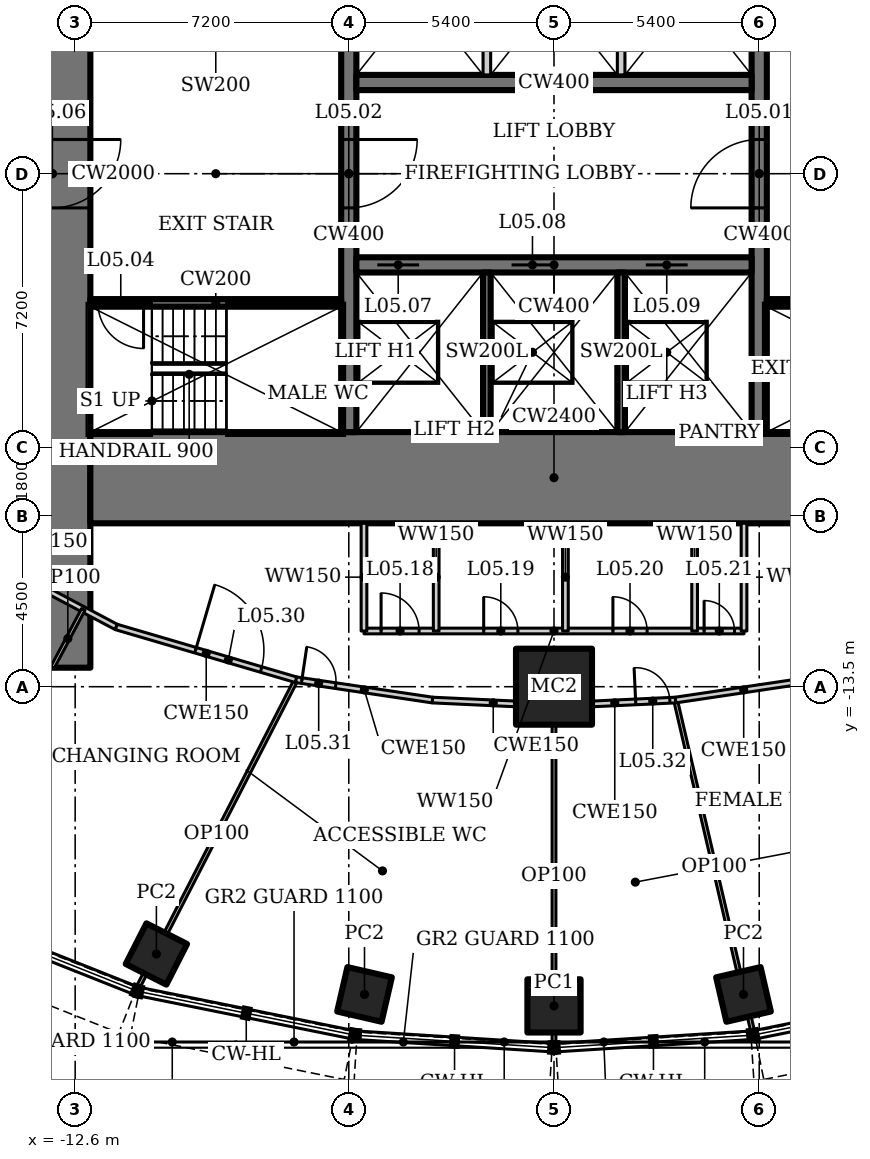
"""IFC4 building model, lengths in metres.
Left out: names, types, materials, properties, quantities, classifications, styles, units other than length and angle.
Written with IfcOpenShell. Run it as: python <this file> out.ifc"""

import sys

from ifc_helpers import new_model, si_unit, direction, frame, frame_2d, origin, origin_2d, place, context, subcontext, project, spatial, rectangle, hollow_rectangle, extrude, element, fill, save


model = new_model("IFC4")
c1 = context("Model", 3, precision=1e-05, world=origin(), true_north=direction((0.0, 1.0)))
c2 = subcontext(c1, "Body", "Model", "MODEL_VIEW")
j1 = project(units=[si_unit("LENGTHUNIT", "METRE"), si_unit("PLANEANGLEUNIT", "RADIAN")], contexts=[c1])
p1 = place(None, origin())
s1 = spatial("IfcSite", under=j1, at=p1, CompositionType="ELEMENT")
p2 = place(p1, origin())
s2 = spatial("IfcBuilding", under=s1, at=p2, CompositionType="ELEMENT")
p3 = place(p2, frame((0.0, 0.0, 32.0)))
s3 = spatial("IfcBuildingStorey", under=s2, at=p3, CompositionType="ELEMENT", Elevation=32.0)
p4 = place(p3, frame((0.0, -13.5, 0.0), z_axis=(0.0, 0.0, 1.0), x_axis=(1.0, 0.0, 0.0)))
e1 = element("IfcColumn", 1, at=p4, inside=s3, PredefinedType="COLUMN", context=c2, shape_type="SweptSolid", body=[
    extrude(hollow_rectangle(XDim=2.0, YDim=2.0, WallThickness=0.17, at=origin_2d()), origin(), (0.0, 0.0, 1.0), 5.0),
])
for number, where, z_axis, x_axis in (
    (2, (-10.463, -20.534, 0.0), (0.0, 0.0, 1.0), (0.454, 0.891, 0.0)),
    (3, (-4.986, -21.598, 0.0), (0.0, 0.0, 1.0), (0.225, 0.974, 0.0)),
):
    element("IfcColumn", number, at=place(p3, frame(where, z_axis=z_axis, x_axis=x_axis)), inside=s3, PredefinedType="COLUMN", context=c2, shape_type="SweptSolid", body=[
        extrude(hollow_rectangle(XDim=1.2, YDim=1.2, WallThickness=0.1, at=origin_2d()), origin(), (0.0, 0.0, 1.0), 5.0),
    ])
p5 = place(p3, frame((0.0, -21.9, 0.0), z_axis=(0.0, 0.0, 1.0), x_axis=(1.0, 0.0, 0.0)))
e4 = element("IfcColumn", 4, at=p5, inside=s3, PredefinedType="COLUMN", context=c2, shape_type="SweptSolid", body=[
    extrude(hollow_rectangle(XDim=1.4, YDim=1.4, WallThickness=0.1, at=origin_2d()), origin(), (0.0, 0.0, 1.0), 5.0),
])
p6 = place(p3, frame((4.986, -21.598, 0.0), z_axis=(0.0, 0.0, 1.0), x_axis=(0.974370064785, 0.224951054344, 0.0)))
e5 = element("IfcColumn", 5, at=p6, inside=s3, PredefinedType="COLUMN", context=c2, shape_type="SweptSolid", body=[
    extrude(hollow_rectangle(XDim=1.2, YDim=1.2, WallThickness=0.1, at=origin_2d()), origin(), (0.0, 0.0, 1.0), 5.0),
])
p7 = place(p3, frame((-13.2, 13.0, 0.0), z_axis=(0.0, 0.0, 1.0), x_axis=(0.0, -1.0, 0.0)))
e6 = element("IfcWall", 6, at=p7, inside=s3, PredefinedType="SHEAR", context=c2, shape_type="SweptSolid", body=[
    extrude(rectangle(XDim=26.0, YDim=2.0, at=frame_2d((13.0, 0.0))), origin(), (0.0, 0.0, 1.0), 5.0),
])
p8 = place(p7, frame((12.1, 0.0, 0.0)))
e7 = element("IfcOpeningElement", 7, at=p8, cuts=e6, PredefinedType="OPENING", context=c2, shape_type="SweptSolid", body=[
    extrude(rectangle(XDim=1.8, YDim=2.1, at=frame_2d((0.9, 1.05))), frame((0.0, 1.01, 0.0), z_axis=(0.0, -1.0, 0.0), x_axis=(1.0, 0.0, 0.0)), (0.0, 0.0, 1.0), 2.02),
])
p9 = place(p3, frame((-12.2, -8.0, 0.0), z_axis=(0.0, 0.0, 1.0), x_axis=(1.0, 0.0, 0.0)))
e8 = element("IfcWall", 8, at=p9, inside=s3, PredefinedType="SHEAR", context=c2, shape_type="SweptSolid", body=[
    extrude(rectangle(XDim=24.4, YDim=2.4, at=frame_2d((12.2, 0.0))), origin(), (0.0, 0.0, 1.0), 5.0),
])
p10 = place(p3, frame((5.4, -6.8, 0.0), z_axis=(0.0, 0.0, 1.0), x_axis=(0.0, 1.0, 0.0)))
e9 = element("IfcWall", 9, at=p10, inside=s3, PredefinedType="SHEAR", context=c2, shape_type="SweptSolid", body=[
    extrude(rectangle(XDim=13.6, YDim=0.4, at=frame_2d((6.8, 0.0))), origin(), (0.0, 0.0, 1.0), 5.0),
])
p11 = place(p10, frame((5.9, 0.0, 0.0)))
e10 = element("IfcOpeningElement", 10, at=p11, cuts=e9, PredefinedType="OPENING", context=c2, shape_type="SweptSolid", body=[
    extrude(rectangle(XDim=1.8, YDim=2.1, at=frame_2d((0.9, 1.05))), frame((0.0, 0.21, 0.0), z_axis=(0.0, -1.0, 0.0), x_axis=(1.0, 0.0, 0.0)), (0.0, 0.0, 1.0), 0.42),
])
p12 = place(p3, frame((-5.4, 6.8, 0.0), z_axis=(0.0, 0.0, 1.0), x_axis=(0.0, -1.0, 0.0)))
e11 = element("IfcWall", 11, at=p12, inside=s3, PredefinedType="SHEAR", context=c2, shape_type="SweptSolid", body=[
    extrude(rectangle(XDim=13.6, YDim=0.4, at=frame_2d((6.8, 0.0))), origin(), (0.0, 0.0, 1.0), 5.0),
])
p13 = place(p12, frame((5.9, 0.0, 0.0)))
e12 = element("IfcOpeningElement", 12, at=p13, cuts=e11, PredefinedType="OPENING", context=c2, shape_type="SweptSolid", body=[
    extrude(rectangle(XDim=1.8, YDim=2.1, at=frame_2d((0.9, 1.05))), frame((0.0, 0.21, 0.0), z_axis=(0.0, -1.0, 0.0), x_axis=(1.0, 0.0, 0.0)), (0.0, 0.0, 1.0), 0.42),
])
p14 = place(p3, frame((-5.2, -2.4, 0.0), z_axis=(0.0, 0.0, 1.0), x_axis=(1.0, 0.0, 0.0)))
e13 = element("IfcWall", 13, at=p14, inside=s3, PredefinedType="SHEAR", context=c2, shape_type="SweptSolid", body=[
    extrude(rectangle(XDim=10.4, YDim=0.4, at=frame_2d((5.2, 0.0))), origin(), (0.0, 0.0, 1.0), 5.0),
])
p15 = place(p14, frame((0.55, 0.0, 0.0)))
e14 = element("IfcOpeningElement", 14, at=p15, cuts=e13, PredefinedType="OPENING", context=c2, shape_type="SweptSolid", body=[
    extrude(rectangle(XDim=1.1, YDim=2.2, at=frame_2d((0.55, 1.1))), frame((0.0, 0.21, 0.0), z_axis=(0.0, -1.0, 0.0), x_axis=(1.0, 0.0, 0.0)), (0.0, 0.0, 1.0), 0.42),
])
p16 = place(p14, frame((4.083, 0.0, 0.0)))
e15 = element("IfcOpeningElement", 15, at=p16, cuts=e13, PredefinedType="OPENING", context=c2, shape_type="SweptSolid", body=[
    extrude(rectangle(XDim=1.1, YDim=2.2, at=frame_2d((0.55, 1.1))), frame((0.0, 0.21, 0.0), z_axis=(0.0, -1.0, 0.0), x_axis=(1.0, 0.0, 0.0)), (0.0, 0.0, 1.0), 0.42),
])
p17 = place(p14, frame((7.617, 0.0, 0.0)))
e16 = element("IfcOpeningElement", 16, at=p17, cuts=e13, PredefinedType="OPENING", context=c2, shape_type="SweptSolid", body=[
    extrude(rectangle(XDim=1.1, YDim=2.2, at=frame_2d((0.55, 1.1))), frame((0.0, 0.21, 0.0), z_axis=(0.0, -1.0, 0.0), x_axis=(1.0, 0.0, 0.0)), (0.0, 0.0, 1.0), 0.42),
])
for number, where, z_axis, x_axis in (
    (17, (-1.767, -2.6, 0.0), (0.0, 0.0, 1.0), (0.0, -1.0, 0.0)),
    (18, (1.767, -2.6, 0.0), (0.0, 0.0, 1.0), (0.0, -1.0, 0.0)),
):
    element("IfcWall", number, at=place(p3, frame(where, z_axis=z_axis, x_axis=x_axis)), inside=s3, PredefinedType="SOLIDWALL", context=c2, shape_type="SweptSolid", body=[
        extrude(rectangle(XDim=4.2, YDim=0.2, at=frame_2d((2.1, 0.0))), origin(), (0.0, 0.0, 1.0), 5.0),
    ])
p18 = place(p3, frame((5.2, 2.4, 0.0), z_axis=(0.0, 0.0, 1.0), x_axis=(-1.0, 0.0, 0.0)))
e19 = element("IfcWall", 19, at=p18, inside=s3, PredefinedType="SHEAR", context=c2, shape_type="SweptSolid", body=[
    extrude(rectangle(XDim=10.4, YDim=0.4, at=frame_2d((5.2, 0.0))), origin(), (0.0, 0.0, 1.0), 5.0),
])
for number, where, z_axis, x_axis in (
    (20, (-1.767, 2.6, 0.0), (0.0, 0.0, 1.0), (0.0, 1.0, 0.0)),
    (21, (1.767, 2.6, 0.0), (0.0, 0.0, 1.0), (0.0, 1.0, 0.0)),
):
    element("IfcWall", number, at=place(p3, frame(where, z_axis=z_axis, x_axis=x_axis)), inside=s3, PredefinedType="SOLIDWALL", context=c2, shape_type="SweptSolid", body=[
        extrude(rectangle(XDim=4.2, YDim=0.2, at=frame_2d((2.1, 0.0))), origin(), (0.0, 0.0, 1.0), 5.0),
    ])
p19 = place(p3, frame((5.6, -3.4, 0.0), z_axis=(0.0, 0.0, 1.0), x_axis=(1.0, 0.0, 0.0)))
e22 = element("IfcWall", 22, at=p19, inside=s3, PredefinedType="SHEAR", context=c2, shape_type="SweptSolid", body=[
    extrude(rectangle(XDim=6.6, YDim=0.2, at=frame_2d((3.3, 0.0))), origin(), (0.0, 0.0, 1.0), 5.0),
])
p20 = place(p19, frame((5.2, 0.0, 0.0)))
e23 = element("IfcOpeningElement", 23, at=p20, cuts=e22, PredefinedType="OPENING", context=c2, shape_type="SweptSolid", body=[
    extrude(rectangle(XDim=1.2, YDim=2.1, at=frame_2d((0.6, 1.05))), frame((0.0, 0.11, 0.0), z_axis=(0.0, -1.0, 0.0), x_axis=(1.0, 0.0, 0.0)), (0.0, 0.0, 1.0), 0.22),
])
p21 = place(p3, frame((-5.6, -3.4, 0.0), z_axis=(0.0, 0.0, 1.0), x_axis=(-1.0, 0.0, 0.0)))
e24 = element("IfcWall", 24, at=p21, inside=s3, PredefinedType="SHEAR", context=c2, shape_type="SweptSolid", body=[
    extrude(rectangle(XDim=6.6, YDim=0.2, at=frame_2d((3.3, 0.0))), origin(), (0.0, 0.0, 1.0), 5.0),
])
p22 = place(p21, frame((5.2, 0.0, 0.0)))
e25 = element("IfcOpeningElement", 25, at=p22, cuts=e24, PredefinedType="OPENING", context=c2, shape_type="SweptSolid", body=[
    extrude(rectangle(XDim=1.2, YDim=2.1, at=frame_2d((0.6, 1.05))), frame((0.0, 0.11, 0.0), z_axis=(0.0, -1.0, 0.0), x_axis=(1.0, 0.0, 0.0)), (0.0, 0.0, 1.0), 0.22),
])
p23 = place(p3, frame((-10.967, -21.453, 0.0), z_axis=(0.0, 0.0, 1.0), x_axis=(0.457125463925, 0.889402220726, 0.0)))
e26 = element("IfcWall", 26, at=p23, inside=s3, PredefinedType="PARTITIONING", context=c2, shape_type="SweptSolid", body=[
    extrude(rectangle(XDim=9.147, YDim=0.1, at=frame_2d((4.574, 0.0))), origin(), (0.0, 0.0, 1.0), 3.928),
])
p24 = place(p3, frame((0.0, -22.945, 0.0), z_axis=(0.0, 0.0, 1.0), x_axis=(0.0, 1.0, 0.0)))
e27 = element("IfcWall", 27, at=p24, inside=s3, PredefinedType="PARTITIONING", context=c2, shape_type="SweptSolid", body=[
    extrude(rectangle(XDim=8.945, YDim=0.1, at=frame_2d((4.472, 0.0))), origin(), (0.0, 0.0, 1.0), 4.324),
])
p25 = place(p3, frame((5.238, -22.613, 0.0), z_axis=(0.0, 0.0, 1.0), x_axis=(-0.226801487876, 0.97394100699, 0.0)))
e28 = element("IfcWall", 28, at=p25, inside=s3, PredefinedType="PARTITIONING", context=c2, shape_type="SweptSolid", body=[
    extrude(rectangle(XDim=8.996, YDim=0.1, at=frame_2d((4.498, 0.0))), origin(), (0.0, 0.0, 1.0), 4.167),
])
p26 = place(p3, frame((-16.369, -9.354, 0.0), z_axis=(0.0, 0.0, 1.0), x_axis=(0.883334368785, -0.468743419071, 0.0)))
e29 = element("IfcWall", 29, at=p26, inside=s3, PredefinedType="PARTITIONING", context=c2, shape_type="SweptSolid", body=[
    extrude(rectangle(XDim=5.491, YDim=0.15, at=frame_2d((2.746, 0.0))), origin(), (0.0, 0.0, 1.0), 4.85),
])
p27 = place(p3, frame((-11.519, -11.928, 0.0), z_axis=(0.0, 0.0, 1.0), x_axis=(0.959496227294, -0.281721475589, 0.0)))
e30 = element("IfcWall", 30, at=p27, inside=s3, PredefinedType="PARTITIONING", context=c2, shape_type="SweptSolid", body=[
    extrude(rectangle(XDim=4.933, YDim=0.15, at=frame_2d((2.466, 0.0))), origin(), (0.0, 0.0, 1.0), 4.85),
])
p28 = place(p27, frame((2.173, 0.0, 0.0)))
e31 = element("IfcOpeningElement", 31, at=p28, cuts=e30, PredefinedType="OPENING", context=c2, shape_type="SweptSolid", body=[
    extrude(rectangle(XDim=1.8, YDim=2.1, at=frame_2d((0.9, 1.05))), frame((0.0, 0.085, 0.0), z_axis=(0.0, -1.0, 0.0), x_axis=(1.0, 0.0, 0.0)), (0.0, 0.0, 1.0), 0.17),
])
p29 = place(p3, frame((-6.786, -13.317, 0.0), z_axis=(0.0, 0.0, 1.0), x_axis=(0.989107488999, -0.14719502439, 0.0)))
e32 = element("IfcWall", 32, at=p29, inside=s3, PredefinedType="PARTITIONING", context=c2, shape_type="SweptSolid", body=[
    extrude(rectangle(XDim=3.627, YDim=0.15, at=frame_2d((1.814, 0.0))), origin(), (0.0, 0.0, 1.0), 4.85),
])
p30 = place(p29, frame((0.15, 0.0, 0.0)))
e33 = element("IfcOpeningElement", 33, at=p30, cuts=e32, PredefinedType="OPENING", context=c2, shape_type="SweptSolid", body=[
    extrude(rectangle(XDim=0.9, YDim=2.1, at=frame_2d((0.45, 1.05))), frame((0.0, 0.085, 0.0), z_axis=(0.0, -1.0, 0.0), x_axis=(1.0, 0.0, 0.0)), (0.0, 0.0, 1.0), 0.17),
])
p31 = place(p3, frame((-3.198, -13.851, 0.0), z_axis=(0.0, 0.0, 1.0), x_axis=(0.998920826789, -0.046445471333, 0.0)))
e34 = element("IfcWall", 34, at=p31, inside=s3, PredefinedType="PARTITIONING", context=c2, shape_type="SweptSolid", body=[
    extrude(rectangle(XDim=3.201, YDim=0.15, at=frame_2d((1.601, 0.0))), origin(), (0.0, 0.0, 1.0), 4.85),
])
p32 = place(p3, frame((0.0, -14.0, 0.0), z_axis=(0.0, 0.0, 1.0), x_axis=(0.998920826789, 0.046445471333, 0.0)))
e35 = element("IfcWall", 35, at=p32, inside=s3, PredefinedType="PARTITIONING", context=c2, shape_type="SweptSolid", body=[
    extrude(rectangle(XDim=3.201, YDim=0.15, at=frame_2d((1.601, 0.0))), origin(), (0.0, 0.0, 1.0), 4.85),
])
p33 = place(p32, frame((2.151, 0.0, 0.0)))
e36 = element("IfcOpeningElement", 36, at=p33, cuts=e35, PredefinedType="OPENING", context=c2, shape_type="SweptSolid", body=[
    extrude(rectangle(XDim=0.9, YDim=2.1, at=frame_2d((0.45, 1.05))), frame((0.0, 0.085, 0.0), z_axis=(0.0, -1.0, 0.0), x_axis=(1.0, 0.0, 0.0)), (0.0, 0.0, 1.0), 0.17),
])
p34 = place(p3, frame((3.198, -13.851, 0.0), z_axis=(0.0, 0.0, 1.0), x_axis=(0.989107488999, 0.14719502439, 0.0)))
e37 = element("IfcWall", 37, at=p34, inside=s3, PredefinedType="PARTITIONING", context=c2, shape_type="SweptSolid", body=[
    extrude(rectangle(XDim=3.627, YDim=0.15, at=frame_2d((1.814, 0.0))), origin(), (0.0, 0.0, 1.0), 4.85),
])
p35 = place(p3, frame((-5.0, -12.034, 0.0), z_axis=(0.0, 0.0, 1.0), x_axis=(1.0, 0.0, 0.0)))
e38 = element("IfcWall", 38, at=p35, inside=s3, PredefinedType="SOLIDWALL", context=c2, shape_type="SweptSolid", body=[
    extrude(rectangle(XDim=10.0, YDim=0.15, at=frame_2d((5.0, 0.0))), origin(), (0.0, 0.0, 1.0), 4.85),
])
p36 = place(p35, frame((0.45, 0.0, 0.0)))
e39 = element("IfcOpeningElement", 39, at=p36, cuts=e38, PredefinedType="OPENING", context=c2, shape_type="SweptSolid", body=[
    extrude(rectangle(XDim=1.0, YDim=2.1, at=frame_2d((0.5, 1.05))), frame((0.0, 0.085, 0.0), z_axis=(0.0, -1.0, 0.0), x_axis=(1.0, 0.0, 0.0)), (0.0, 0.0, 1.0), 0.17),
])
p37 = place(p35, frame((3.15, 0.0, 0.0)))
e40 = element("IfcOpeningElement", 40, at=p37, cuts=e38, PredefinedType="OPENING", context=c2, shape_type="SweptSolid", body=[
    extrude(rectangle(XDim=0.9, YDim=2.1, at=frame_2d((0.45, 1.05))), frame((0.0, 0.085, 0.0), z_axis=(0.0, -1.0, 0.0), x_axis=(1.0, 0.0, 0.0)), (0.0, 0.0, 1.0), 0.17),
])
p38 = place(p35, frame((6.55, 0.0, 0.0)))
e41 = element("IfcOpeningElement", 41, at=p38, cuts=e38, PredefinedType="OPENING", context=c2, shape_type="SweptSolid", body=[
    extrude(rectangle(XDim=0.9, YDim=2.1, at=frame_2d((0.45, 1.05))), frame((0.0, 0.085, 0.0), z_axis=(0.0, -1.0, 0.0), x_axis=(1.0, 0.0, 0.0)), (0.0, 0.0, 1.0), 0.17),
])
p39 = place(p35, frame((8.95, 0.0, 0.0)))
e42 = element("IfcOpeningElement", 42, at=p39, cuts=e38, PredefinedType="OPENING", context=c2, shape_type="SweptSolid", body=[
    extrude(rectangle(XDim=0.8, YDim=2.1, at=frame_2d((0.4, 1.05))), frame((0.0, 0.085, 0.0), z_axis=(0.0, -1.0, 0.0), x_axis=(1.0, 0.0, 0.0)), (0.0, 0.0, 1.0), 0.17),
])
for number, where, z_axis, x_axis in (
    (43, (-5.0, -9.2, 0.0), (0.0, 0.0, 1.0), (0.0, -1.0, 0.0)),
    (44, (5.0, -9.2, 0.0), (0.0, 0.0, 1.0), (0.0, -1.0, 0.0)),
    (45, (-3.1, -9.2, 0.0), (0.0, 0.0, 1.0), (0.0, -1.0, 0.0)),
    (46, (0.3, -9.2, 0.0), (0.0, 0.0, 1.0), (0.0, -1.0, 0.0)),
    (47, (3.7, -9.2, 0.0), (0.0, 0.0, 1.0), (0.0, -1.0, 0.0)),
):
    element("IfcWall", number, at=place(p3, frame(where, z_axis=z_axis, x_axis=x_axis)), inside=s3, PredefinedType="SOLIDWALL", context=c2, shape_type="SweptSolid", body=[
        extrude(rectangle(XDim=2.834, YDim=0.15, at=frame_2d((1.417, 0.0))), origin(), (0.0, 0.0, 1.0), 4.85),
    ])
p40 = place(p3, frame((-13.2, -13.0, 0.0), z_axis=(0.0, 0.0, 1.0), x_axis=(0.46874717052, 0.88333237806, 0.0)))
e48 = element("IfcWall", 48, at=p40, inside=s3, PredefinedType="PARTITIONING", context=c2, shape_type="SweptSolid", body=[
    extrude(rectangle(XDim=1.735, YDim=0.1, at=frame_2d((0.868, 0.0))), origin(), (0.0, 0.0, 1.0), 4.85),
])
p41 = place(p11, origin())
e49 = element("IfcDoor", 49, at=p41, inside=s3, OperationType="DOUBLE_DOOR_DOUBLE_SWING", PredefinedType="DOOR", context=c2, shape_type="SweptSolid", body=[
    extrude(rectangle(XDim=1.8, YDim=2.1, at=frame_2d((0.9, 1.05))), frame((0.0, 0.025, 0.0), z_axis=(0.0, -1.0, 0.0), x_axis=(1.0, 0.0, 0.0)), (0.0, 0.0, 1.0), 0.05),
])
fill(e10, e49)
p42 = place(p13, origin())
e50 = element("IfcDoor", 50, at=p42, inside=s3, OperationType="DOUBLE_DOOR_DOUBLE_SWING", PredefinedType="DOOR", context=c2, shape_type="SweptSolid", body=[
    extrude(rectangle(XDim=1.8, YDim=2.1, at=frame_2d((0.9, 1.05))), frame((0.0, 0.025, 0.0), z_axis=(0.0, -1.0, 0.0), x_axis=(1.0, 0.0, 0.0)), (0.0, 0.0, 1.0), 0.05),
])
fill(e12, e50)
p43 = place(p22, origin())
e51 = element("IfcDoor", 51, at=p43, inside=s3, OperationType="SINGLE_SWING_RIGHT", PredefinedType="DOOR", context=c2, shape_type="SweptSolid", body=[
    extrude(rectangle(XDim=1.2, YDim=2.1, at=frame_2d((0.6, 1.05))), frame((0.0, 0.025, 0.0), z_axis=(0.0, -1.0, 0.0), x_axis=(1.0, 0.0, 0.0)), (0.0, 0.0, 1.0), 0.05),
])
fill(e25, e51)
p44 = place(p8, origin())
e52 = element("IfcDoor", 52, at=p44, inside=s3, OperationType="DOUBLE_DOOR_DOUBLE_SWING", PredefinedType="DOOR", context=c2, shape_type="SweptSolid", body=[
    extrude(rectangle(XDim=1.8, YDim=2.1, at=frame_2d((0.9, 1.05))), frame((0.0, 0.025, 0.0), z_axis=(0.0, -1.0, 0.0), x_axis=(1.0, 0.0, 0.0)), (0.0, 0.0, 1.0), 0.05),
])
fill(e7, e52)
p45 = place(p15, origin())
e53 = element("IfcDoor", 53, at=p45, inside=s3, OperationType="DOUBLE_DOOR_SLIDING", PredefinedType="DOOR", context=c2, shape_type="SweptSolid", body=[
    extrude(rectangle(XDim=1.1, YDim=2.2, at=frame_2d((0.55, 1.1))), frame((0.0, 0.025, 0.0), z_axis=(0.0, -1.0, 0.0), x_axis=(1.0, 0.0, 0.0)), (0.0, 0.0, 1.0), 0.05),
])
fill(e14, e53)
p46 = place(p16, origin())
e54 = element("IfcDoor", 54, at=p46, inside=s3, OperationType="DOUBLE_DOOR_SLIDING", PredefinedType="DOOR", context=c2, shape_type="SweptSolid", body=[
    extrude(rectangle(XDim=1.1, YDim=2.2, at=frame_2d((0.55, 1.1))), frame((0.0, 0.025, 0.0), z_axis=(0.0, -1.0, 0.0), x_axis=(1.0, 0.0, 0.0)), (0.0, 0.0, 1.0), 0.05),
])
fill(e15, e54)
p47 = place(p17, origin())
e55 = element("IfcDoor", 55, at=p47, inside=s3, OperationType="DOUBLE_DOOR_SLIDING", PredefinedType="DOOR", context=c2, shape_type="SweptSolid", body=[
    extrude(rectangle(XDim=1.1, YDim=2.2, at=frame_2d((0.55, 1.1))), frame((0.0, 0.025, 0.0), z_axis=(0.0, -1.0, 0.0), x_axis=(1.0, 0.0, 0.0)), (0.0, 0.0, 1.0), 0.05),
])
fill(e16, e55)
p48 = place(p36, origin())
e56 = element("IfcDoor", 56, at=p48, inside=s3, OperationType="SINGLE_SWING_LEFT", PredefinedType="DOOR", context=c2, shape_type="SweptSolid", body=[
    extrude(rectangle(XDim=1.0, YDim=2.1, at=frame_2d((0.5, 1.05))), frame((0.0, 0.025, 0.0), z_axis=(0.0, -1.0, 0.0), x_axis=(1.0, 0.0, 0.0)), (0.0, 0.0, 1.0), 0.05),
])
fill(e39, e56)
p49 = place(p37, origin())
e57 = element("IfcDoor", 57, at=p49, inside=s3, OperationType="SINGLE_SWING_LEFT", PredefinedType="DOOR", context=c2, shape_type="SweptSolid", body=[
    extrude(rectangle(XDim=0.9, YDim=2.1, at=frame_2d((0.45, 1.05))), frame((0.0, 0.025, 0.0), z_axis=(0.0, -1.0, 0.0), x_axis=(1.0, 0.0, 0.0)), (0.0, 0.0, 1.0), 0.05),
])
fill(e40, e57)
p50 = place(p38, origin())
e58 = element("IfcDoor", 58, at=p50, inside=s3, OperationType="SINGLE_SWING_LEFT", PredefinedType="DOOR", context=c2, shape_type="SweptSolid", body=[
    extrude(rectangle(XDim=0.9, YDim=2.1, at=frame_2d((0.45, 1.05))), frame((0.0, 0.025, 0.0), z_axis=(0.0, -1.0, 0.0), x_axis=(1.0, 0.0, 0.0)), (0.0, 0.0, 1.0), 0.05),
])
fill(e41, e58)
p51 = place(p39, origin())
e59 = element("IfcDoor", 59, at=p51, inside=s3, OperationType="SINGLE_SWING_LEFT", PredefinedType="DOOR", context=c2, shape_type="SweptSolid", body=[
    extrude(rectangle(XDim=0.8, YDim=2.1, at=frame_2d((0.4, 1.05))), frame((0.0, 0.025, 0.0), z_axis=(0.0, -1.0, 0.0), x_axis=(1.0, 0.0, 0.0)), (0.0, 0.0, 1.0), 0.05),
])
fill(e42, e59)
p52 = place(p28, origin())
e60 = element("IfcDoor", 60, at=p52, inside=s3, OperationType="DOUBLE_DOOR_DOUBLE_SWING", PredefinedType="DOOR", context=c2, shape_type="SweptSolid", body=[
    extrude(rectangle(XDim=1.8, YDim=2.1, at=frame_2d((0.9, 1.05))), frame((0.0, 0.025, 0.0), z_axis=(0.0, -1.0, 0.0), x_axis=(1.0, 0.0, 0.0)), (0.0, 0.0, 1.0), 0.05),
])
fill(e31, e60)
p53 = place(p30, origin())
e61 = element("IfcDoor", 61, at=p53, inside=s3, OperationType="SINGLE_SWING_LEFT", PredefinedType="DOOR", context=c2, shape_type="SweptSolid", body=[
    extrude(rectangle(XDim=0.9, YDim=2.1, at=frame_2d((0.45, 1.05))), frame((0.0, 0.025, 0.0), z_axis=(0.0, -1.0, 0.0), x_axis=(1.0, 0.0, 0.0)), (0.0, 0.0, 1.0), 0.05),
])
fill(e33, e61)
p54 = place(p33, origin())
e62 = element("IfcDoor", 62, at=p54, inside=s3, OperationType="SINGLE_SWING_LEFT", PredefinedType="DOOR", context=c2, shape_type="SweptSolid", body=[
    extrude(rectangle(XDim=0.9, YDim=2.1, at=frame_2d((0.45, 1.05))), frame((0.0, 0.025, 0.0), z_axis=(0.0, -1.0, 0.0), x_axis=(1.0, 0.0, 0.0)), (0.0, 0.0, 1.0), 0.05),
])
fill(e36, e62)
save(model, sys.argv[1])
